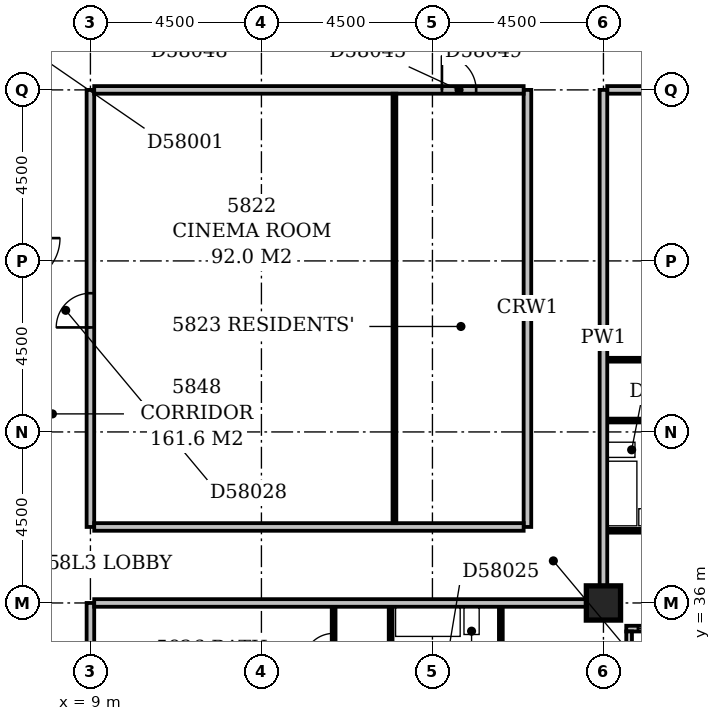
"""IFC4 building model, lengths in metres.
Left out: names, types, materials, properties, quantities, classifications, styles, units other than length and angle.
Written with IfcOpenShell. Run it as: python <this file> out.ifc"""

import sys

from ifc_helpers import new_model, si_unit, direction, frame, frame_2d, origin, origin_2d, place, context, subcontext, project, spatial, rectangle, extrude, element, fill, save


model = new_model("IFC4")
c1 = context("Model", 3, precision=1e-05, world=origin(), true_north=direction((0.0, 1.0)))
c2 = subcontext(c1, "Body", "Model", "MODEL_VIEW")
j1 = project(units=[si_unit("LENGTHUNIT", "METRE"), si_unit("PLANEANGLEUNIT", "RADIAN")], contexts=[c1])
p1 = place(None, origin())
s1 = spatial("IfcSite", under=j1, at=p1, CompositionType="ELEMENT")
p2 = place(p1, origin())
s2 = spatial("IfcBuilding", under=s1, at=p2, CompositionType="ELEMENT")
p3 = place(p2, frame((0.0, 0.0, 225.8)))
s3 = spatial("IfcBuildingStorey", under=s2, at=p3, CompositionType="ELEMENT", Elevation=225.8)
p4 = place(p3, frame((22.5, 36.0, -0.3), z_axis=(0.0, 0.0, 1.0), x_axis=(1.0, 0.0, 0.0)))
e1 = element("IfcColumn", 1, at=p4, inside=s3, PredefinedType="COLUMN", context=c2, shape_type="SweptSolid", body=[
    extrude(rectangle(XDim=0.9, YDim=0.9, at=origin_2d()), origin(), (0.0, 0.0, 1.0), 3.6),
])
p5 = place(p3, frame((23.175, 17.4, 0.0), z_axis=(0.0, 0.0, 1.0), x_axis=(0.0, 1.0, 0.0)))
e2 = element("IfcWall", 2, at=p5, inside=s3, PredefinedType="STANDARD", context=c2, shape_type="SweptSolid", body=[
    extrude(rectangle(XDim=17.85, YDim=0.15, at=frame_2d((8.925, 0.0))), origin(), (0.0, 0.0, 1.0), 2.7),
])
p6 = place(p5, frame((1.377, 0.0, 0.6)))
e3 = element("IfcOpeningElement", 3, at=p6, cuts=e2, PredefinedType="OPENING", context=c2, shape_type="SweptSolid", body=[
    extrude(rectangle(XDim=2.1, YDim=1.8, at=frame_2d((1.05, 0.9))), frame((0.0, 0.087, 0.0), z_axis=(0.0, -1.0, 0.0), x_axis=(1.0, 0.0, 0.0)), (0.0, 0.0, 1.0), 0.174),
])
p7 = place(p5, frame((6.15, 0.0, 0.6)))
e4 = element("IfcOpeningElement", 4, at=p7, cuts=e2, PredefinedType="OPENING", context=c2, shape_type="SweptSolid", body=[
    extrude(rectangle(XDim=2.4, YDim=1.8, at=frame_2d((1.2, 0.9))), frame((0.0, 0.087, 0.0), z_axis=(0.0, -1.0, 0.0), x_axis=(1.0, 0.0, 0.0)), (0.0, 0.0, 1.0), 0.174),
])
p8 = place(p5, frame((10.65, 0.0, 0.6)))
e5 = element("IfcOpeningElement", 5, at=p8, cuts=e2, PredefinedType="OPENING", context=c2, shape_type="SweptSolid", body=[
    extrude(rectangle(XDim=2.4, YDim=1.8, at=frame_2d((1.2, 0.9))), frame((0.0, 0.087, 0.0), z_axis=(0.0, -1.0, 0.0), x_axis=(1.0, 0.0, 0.0)), (0.0, 0.0, 1.0), 0.174),
])
p9 = place(p5, frame((15.15, 0.0, 0.6)))
e6 = element("IfcOpeningElement", 6, at=p9, cuts=e2, PredefinedType="OPENING", context=c2, shape_type="SweptSolid", body=[
    extrude(rectangle(XDim=2.4, YDim=1.8, at=frame_2d((1.2, 0.9))), frame((0.0, 0.087, 0.0), z_axis=(0.0, -1.0, 0.0), x_axis=(1.0, 0.0, 0.0)), (0.0, 0.0, 1.0), 0.174),
])
p10 = place(p3, frame((23.1, 35.325, 0.0), z_axis=(0.0, 0.0, 1.0), x_axis=(1.0, 0.0, 0.0)))
e7 = element("IfcWall", 7, at=p10, inside=s3, PredefinedType="STANDARD", context=c2, shape_type="SweptSolid", body=[
    extrude(rectangle(XDim=27.15, YDim=0.15, at=frame_2d((13.575, 0.0))), origin(), (0.0, 0.0, 1.0), 2.7),
])
p11 = place(p10, frame((0.306, 0.0, 0.6)))
e8 = element("IfcOpeningElement", 8, at=p11, cuts=e7, PredefinedType="OPENING", context=c2, shape_type="SweptSolid", body=[
    extrude(rectangle(XDim=2.1, YDim=1.8, at=frame_2d((1.05, 0.9))), frame((0.0, 0.087, 0.0), z_axis=(0.0, -1.0, 0.0), x_axis=(1.0, 0.0, 0.0)), (0.0, 0.0, 1.0), 0.174),
])
p12 = place(p10, frame((4.95, 0.0, 0.6)))
e9 = element("IfcOpeningElement", 9, at=p12, cuts=e7, PredefinedType="OPENING", context=c2, shape_type="SweptSolid", body=[
    extrude(rectangle(XDim=2.4, YDim=1.8, at=frame_2d((1.2, 0.9))), frame((0.0, 0.087, 0.0), z_axis=(0.0, -1.0, 0.0), x_axis=(1.0, 0.0, 0.0)), (0.0, 0.0, 1.0), 0.174),
])
p13 = place(p10, frame((9.45, 0.0, 0.6)))
e10 = element("IfcOpeningElement", 10, at=p13, cuts=e7, PredefinedType="OPENING", context=c2, shape_type="SweptSolid", body=[
    extrude(rectangle(XDim=2.4, YDim=1.8, at=frame_2d((1.2, 0.9))), frame((0.0, 0.087, 0.0), z_axis=(0.0, -1.0, 0.0), x_axis=(1.0, 0.0, 0.0)), (0.0, 0.0, 1.0), 0.174),
])
p14 = place(p10, frame((13.95, 0.0, 0.6)))
e11 = element("IfcOpeningElement", 11, at=p14, cuts=e7, PredefinedType="OPENING", context=c2, shape_type="SweptSolid", body=[
    extrude(rectangle(XDim=2.4, YDim=1.8, at=frame_2d((1.2, 0.9))), frame((0.0, 0.087, 0.0), z_axis=(0.0, -1.0, 0.0), x_axis=(1.0, 0.0, 0.0)), (0.0, 0.0, 1.0), 0.174),
])
p15 = place(p10, frame((18.45, 0.0, 0.6)))
e12 = element("IfcOpeningElement", 12, at=p15, cuts=e7, PredefinedType="OPENING", context=c2, shape_type="SweptSolid", body=[
    extrude(rectangle(XDim=2.4, YDim=1.8, at=frame_2d((1.2, 0.9))), frame((0.0, 0.087, 0.0), z_axis=(0.0, -1.0, 0.0), x_axis=(1.0, 0.0, 0.0)), (0.0, 0.0, 1.0), 0.174),
])
p16 = place(p10, frame((24.157, 0.0, 0.6)))
e13 = element("IfcOpeningElement", 13, at=p16, cuts=e7, PredefinedType="OPENING", context=c2, shape_type="SweptSolid", body=[
    extrude(rectangle(XDim=1.5, YDim=1.8, at=frame_2d((0.75, 0.9))), frame((0.0, 0.087, 0.0), z_axis=(0.0, -1.0, 0.0), x_axis=(1.0, 0.0, 0.0)), (0.0, 0.0, 1.0), 0.174),
])
p17 = place(p3, frame((9.0, 18.45, 0.0), z_axis=(0.0, 0.0, 1.0), x_axis=(0.0, 1.0, 0.0)))
e14 = element("IfcWall", 14, at=p17, inside=s3, PredefinedType="PARTITIONING", context=c2, shape_type="SweptSolid", body=[
    extrude(rectangle(XDim=17.55, YDim=0.2, at=frame_2d((8.775, 0.0))), origin(), (0.0, 0.0, 1.0), 3.3),
])
p18 = place(p17, frame((13.85, 0.0, 0.0)))
e15 = element("IfcOpeningElement", 15, at=p18, cuts=e14, PredefinedType="OPENING", context=c2, shape_type="SweptSolid", body=[
    extrude(rectangle(XDim=1.0, YDim=2.1, at=frame_2d((0.5, 1.05))), frame((0.0, 0.112, 0.0), z_axis=(0.0, -1.0, 0.0), x_axis=(1.0, 0.0, 0.0)), (0.0, 0.0, 1.0), 0.224),
])
p19 = place(p17, frame((3.25, 0.0, 0.0)))
e16 = element("IfcOpeningElement", 16, at=p19, cuts=e14, PredefinedType="OPENING", context=c2, shape_type="SweptSolid", body=[
    extrude(rectangle(XDim=1.0, YDim=2.1, at=frame_2d((0.5, 1.05))), frame((0.0, 0.112, 0.0), z_axis=(0.0, -1.0, 0.0), x_axis=(1.0, 0.0, 0.0)), (0.0, 0.0, 1.0), 0.224),
])
p20 = place(p3, frame((16.9, 27.1, 0.0), z_axis=(0.0, 0.0, 1.0), x_axis=(0.0, 1.0, 0.0)))
e17 = element("IfcWall", 17, at=p20, inside=s3, PredefinedType="PARTITIONING", context=c2, shape_type="SweptSolid", body=[
    extrude(rectangle(XDim=8.8, YDim=0.1, at=frame_2d((4.4, 0.0))), origin(), (0.0, 0.0, 1.0), 3.3),
])
p21 = place(p20, frame((1.7, 0.0, 0.0)))
e18 = element("IfcOpeningElement", 18, at=p21, cuts=e17, PredefinedType="OPENING", context=c2, shape_type="SweptSolid", body=[
    extrude(rectangle(XDim=0.9, YDim=2.1, at=frame_2d((0.45, 1.05))), frame((0.0, 0.062, 0.0), z_axis=(0.0, -1.0, 0.0), x_axis=(1.0, 0.0, 0.0)), (0.0, 0.0, 1.0), 0.124),
])
p22 = place(p20, frame((5.05, 0.0, 0.0)))
e19 = element("IfcOpeningElement", 19, at=p22, cuts=e17, PredefinedType="OPENING", context=c2, shape_type="SweptSolid", body=[
    extrude(rectangle(XDim=0.9, YDim=2.1, at=frame_2d((0.45, 1.05))), frame((0.0, 0.062, 0.0), z_axis=(0.0, -1.0, 0.0), x_axis=(1.0, 0.0, 0.0)), (0.0, 0.0, 1.0), 0.124),
])
p23 = place(p3, frame((15.4, 33.6, 0.0), z_axis=(0.0, 0.0, 1.0), x_axis=(0.0, 1.0, 0.0)))
e20 = element("IfcWall", 20, at=p23, inside=s3, PredefinedType="PARTITIONING", context=c2, shape_type="SweptSolid", body=[
    extrude(rectangle(XDim=2.3, YDim=0.1, at=frame_2d((1.15, 0.0))), origin(), (0.0, 0.0, 1.0), 3.3),
])
p24 = place(p23, frame((0.8, 0.0, 0.0)))
e21 = element("IfcOpeningElement", 21, at=p24, cuts=e20, PredefinedType="OPENING", context=c2, shape_type="SweptSolid", body=[
    extrude(rectangle(XDim=0.8, YDim=2.1, at=frame_2d((0.4, 1.05))), frame((0.0, 0.062, 0.0), z_axis=(0.0, -1.0, 0.0), x_axis=(1.0, 0.0, 0.0)), (0.0, 0.0, 1.0), 0.124),
])
p25 = place(p3, frame((19.8, 33.7, 0.0), z_axis=(0.0, 0.0, 1.0), x_axis=(0.0, 1.0, 0.0)))
e22 = element("IfcWall", 22, at=p25, inside=s3, PredefinedType="PLUMBINGWALL", context=c2, shape_type="SweptSolid", body=[
    extrude(rectangle(XDim=2.2, YDim=0.1, at=frame_2d((1.1, 0.0))), origin(), (0.0, 0.0, 1.0), 3.3),
])
p26 = place(p3, frame((9.1, 36.0, 0.0), z_axis=(0.0, 0.0, 1.0), x_axis=(1.0, 0.0, 0.0)))
e23 = element("IfcWall", 23, at=p26, inside=s3, PredefinedType="PARTITIONING", context=c2, shape_type="SweptSolid", body=[
    extrude(rectangle(XDim=12.95, YDim=0.2, at=frame_2d((6.475, 0.0))), origin(), (0.0, 0.0, 1.0), 3.3),
])
p27 = place(p3, frame((22.5, 36.45, 0.0), z_axis=(0.0, 0.0, 1.0), x_axis=(0.0, 1.0, 0.0)))
e24 = element("IfcWall", 24, at=p27, inside=s3, PredefinedType="PARTITIONING", context=c2, shape_type="SweptSolid", body=[
    extrude(rectangle(XDim=13.05, YDim=0.2, at=frame_2d((6.525, 0.0))), origin(), (0.0, 0.0, 1.0), 3.3),
])
p28 = place(p3, frame((22.6, 37.9, 0.0), z_axis=(0.0, 0.0, 1.0), x_axis=(1.0, 0.0, 0.0)))
e25 = element("IfcWall", 25, at=p28, inside=s3, PredefinedType="PLUMBINGWALL", context=c2, shape_type="SweptSolid", body=[
    extrude(rectangle(XDim=2.15, YDim=0.1, at=frame_2d((1.075, 0.0))), origin(), (0.0, 0.0, 1.0), 3.3),
])
p29 = place(p3, frame((9.0, 38.0, 0.0), z_axis=(0.0, 0.0, 1.0), x_axis=(0.0, 1.0, 0.0)))
e26 = element("IfcWall", 26, at=p29, inside=s3, PredefinedType="PARTITIONING", context=c2, shape_type="SweptSolid", body=[
    extrude(rectangle(XDim=11.5, YDim=0.2, at=frame_2d((5.75, 0.0))), origin(), (0.0, 0.0, 1.0), 3.3),
])
p30 = place(p29, frame((5.25, 0.0, 0.0)))
e27 = element("IfcOpeningElement", 27, at=p30, cuts=e26, PredefinedType="OPENING", context=c2, shape_type="SweptSolid", body=[
    extrude(rectangle(XDim=0.9, YDim=2.1, at=frame_2d((0.45, 1.05))), frame((0.0, 0.112, 0.0), z_axis=(0.0, -1.0, 0.0), x_axis=(1.0, 0.0, 0.0)), (0.0, 0.0, 1.0), 0.224),
])
p31 = place(p3, frame((9.1, 38.0, 0.0), z_axis=(0.0, 0.0, 1.0), x_axis=(1.0, 0.0, 0.0)))
e28 = element("IfcWall", 28, at=p31, inside=s3, PredefinedType="PARTITIONING", context=c2, shape_type="SweptSolid", body=[
    extrude(rectangle(XDim=11.3, YDim=0.2, at=frame_2d((5.65, 0.0))), origin(), (0.0, 0.0, 1.0), 3.3),
])
p32 = place(p3, frame((20.5, 38.0, 0.0), z_axis=(0.0, 0.0, 1.0), x_axis=(0.0, 1.0, 0.0)))
e29 = element("IfcWall", 29, at=p32, inside=s3, PredefinedType="PARTITIONING", context=c2, shape_type="SweptSolid", body=[
    extrude(rectangle(XDim=11.5, YDim=0.2, at=frame_2d((5.75, 0.0))), origin(), (0.0, 0.0, 1.0), 3.3),
])
p33 = place(p3, frame((17.0, 38.1, 0.0), z_axis=(0.0, 0.0, 1.0), x_axis=(0.0, 1.0, 0.0)))
e30 = element("IfcWall", 30, at=p33, inside=s3, PredefinedType="PARTITIONING", context=c2, shape_type="SweptSolid", body=[
    extrude(rectangle(XDim=11.3, YDim=0.1, at=frame_2d((5.65, 0.0))), origin(), (0.0, 0.0, 1.0), 3.3),
])
p34 = place(p3, frame((22.6, 40.8, 0.0), z_axis=(0.0, 0.0, 1.0), x_axis=(1.0, 0.0, 0.0)))
e31 = element("IfcWall", 31, at=p34, inside=s3, PredefinedType="PARTITIONING", context=c2, shape_type="SweptSolid", body=[
    extrude(rectangle(XDim=22.3, YDim=0.1, at=frame_2d((11.15, 0.0))), origin(), (0.0, 0.0, 1.0), 3.3),
])
p35 = place(p34, frame((2.85, 0.0, 0.0)))
e32 = element("IfcOpeningElement", 32, at=p35, cuts=e31, PredefinedType="OPENING", context=c2, shape_type="SweptSolid", body=[
    extrude(rectangle(XDim=0.9, YDim=2.1, at=frame_2d((0.45, 1.05))), frame((0.0, 0.062, 0.0), z_axis=(0.0, -1.0, 0.0), x_axis=(1.0, 0.0, 0.0)), (0.0, 0.0, 1.0), 0.124),
])
p36 = place(p34, frame((8.4, 0.0, 0.0)))
e33 = element("IfcOpeningElement", 33, at=p36, cuts=e31, PredefinedType="OPENING", context=c2, shape_type="SweptSolid", body=[
    extrude(rectangle(XDim=0.9, YDim=2.1, at=frame_2d((0.45, 1.05))), frame((0.0, 0.062, 0.0), z_axis=(0.0, -1.0, 0.0), x_axis=(1.0, 0.0, 0.0)), (0.0, 0.0, 1.0), 0.124),
])
p37 = place(p34, frame((14.05, 0.0, 0.0)))
e34 = element("IfcOpeningElement", 34, at=p37, cuts=e31, PredefinedType="OPENING", context=c2, shape_type="SweptSolid", body=[
    extrude(rectangle(XDim=0.9, YDim=2.1, at=frame_2d((0.45, 1.05))), frame((0.0, 0.062, 0.0), z_axis=(0.0, -1.0, 0.0), x_axis=(1.0, 0.0, 0.0)), (0.0, 0.0, 1.0), 0.124),
])
p38 = place(p34, frame((19.7, 0.0, 0.0)))
e35 = element("IfcOpeningElement", 35, at=p38, cuts=e31, PredefinedType="OPENING", context=c2, shape_type="SweptSolid", body=[
    extrude(rectangle(XDim=0.9, YDim=2.1, at=frame_2d((0.45, 1.05))), frame((0.0, 0.062, 0.0), z_axis=(0.0, -1.0, 0.0), x_axis=(1.0, 0.0, 0.0)), (0.0, 0.0, 1.0), 0.124),
])
p39 = place(p3, frame((22.6, 42.4, 0.0), z_axis=(0.0, 0.0, 1.0), x_axis=(1.0, 0.0, 0.0)))
e36 = element("IfcWall", 36, at=p39, inside=s3, PredefinedType="PARTITIONING", context=c2, shape_type="SweptSolid", body=[
    extrude(rectangle(XDim=5.815, YDim=0.1, at=frame_2d((2.908, 0.0))), origin(), (0.0, 0.0, 1.0), 3.3),
])
p40 = place(p39, frame((2.408, 0.0, 0.0)))
e37 = element("IfcOpeningElement", 37, at=p40, cuts=e36, PredefinedType="OPENING", context=c2, shape_type="SweptSolid", body=[
    extrude(rectangle(XDim=0.9, YDim=2.1, at=frame_2d((0.45, 1.05))), frame((0.0, 0.062, 0.0), z_axis=(0.0, -1.0, 0.0), x_axis=(1.0, 0.0, 0.0)), (0.0, 0.0, 1.0), 0.124),
])
p41 = place(p3, frame((9.1, 49.5, 0.0), z_axis=(0.0, 0.0, 1.0), x_axis=(1.0, 0.0, 0.0)))
e38 = element("IfcWall", 38, at=p41, inside=s3, PredefinedType="PARTITIONING", context=c2, shape_type="SweptSolid", body=[
    extrude(rectangle(XDim=11.3, YDim=0.2, at=frame_2d((5.65, 0.0))), origin(), (0.0, 0.0, 1.0), 3.3),
])
p42 = place(p41, frame((9.15, 0.0, 0.0)))
e39 = element("IfcOpeningElement", 39, at=p42, cuts=e38, PredefinedType="OPENING", context=c2, shape_type="SweptSolid", body=[
    extrude(rectangle(XDim=0.9, YDim=2.1, at=frame_2d((0.45, 1.05))), frame((0.0, 0.112, 0.0), z_axis=(0.0, -1.0, 0.0), x_axis=(1.0, 0.0, 0.0)), (0.0, 0.0, 1.0), 0.224),
])
p43 = place(p3, frame((22.6, 49.5, 0.0), z_axis=(0.0, 0.0, 1.0), x_axis=(1.0, 0.0, 0.0)))
e40 = element("IfcWall", 40, at=p43, inside=s3, PredefinedType="PARTITIONING", context=c2, shape_type="SweptSolid", body=[
    extrude(rectangle(XDim=30.95, YDim=0.2, at=frame_2d((15.475, 0.0))), origin(), (0.0, 0.0, 1.0), 3.3),
])
p44 = place(p43, frame((6.115, 0.0, 0.0)))
e41 = element("IfcOpeningElement", 41, at=p44, cuts=e40, PredefinedType="OPENING", context=c2, shape_type="SweptSolid", body=[
    extrude(rectangle(XDim=1.0, YDim=2.1, at=frame_2d((0.5, 1.05))), frame((0.0, 0.112, 0.0), z_axis=(0.0, -1.0, 0.0), x_axis=(1.0, 0.0, 0.0)), (0.0, 0.0, 1.0), 0.224),
])
p45 = place(p43, frame((22.7, 0.0, 0.0)))
e42 = element("IfcOpeningElement", 42, at=p45, cuts=e40, PredefinedType="OPENING", context=c2, shape_type="SweptSolid", body=[
    extrude(rectangle(XDim=1.0, YDim=2.1, at=frame_2d((0.5, 1.05))), frame((0.0, 0.112, 0.0), z_axis=(0.0, -1.0, 0.0), x_axis=(1.0, 0.0, 0.0)), (0.0, 0.0, 1.0), 0.224),
])
p46 = place(p11, origin())
e43 = element("IfcWindow", 43, at=p46, inside=s3, PartitioningType="SINGLE_PANEL", PredefinedType="WINDOW", context=c2, shape_type="SweptSolid", body=[
    extrude(rectangle(XDim=2.1, YDim=1.8, at=frame_2d((1.05, 0.9))), frame((0.0, 0.03, 0.0), z_axis=(0.0, -1.0, 0.0), x_axis=(1.0, 0.0, 0.0)), (0.0, 0.0, 1.0), 0.06),
])
fill(e8, e43)
p47 = place(p24, origin())
e44 = element("IfcDoor", 44, at=p47, inside=s3, OperationType="SINGLE_SWING_LEFT", PredefinedType="DOOR", context=c2, shape_type="SweptSolid", body=[
    extrude(rectangle(XDim=0.8, YDim=2.1, at=frame_2d((0.4, 1.05))), frame((0.0, 0.025, 0.0), z_axis=(0.0, -1.0, 0.0), x_axis=(1.0, 0.0, 0.0)), (0.0, 0.0, 1.0), 0.05),
])
fill(e21, e44)
p48 = place(p30, origin())
e45 = element("IfcDoor", 45, at=p48, inside=s3, OperationType="SINGLE_SWING_LEFT", PredefinedType="DOOR", context=c2, shape_type="SweptSolid", body=[
    extrude(rectangle(XDim=0.9, YDim=2.1, at=frame_2d((0.45, 1.05))), frame((0.0, 0.025, 0.0), z_axis=(0.0, -1.0, 0.0), x_axis=(1.0, 0.0, 0.0)), (0.0, 0.0, 1.0), 0.05),
])
fill(e27, e45)
p49 = place(p42, origin())
e46 = element("IfcDoor", 46, at=p49, inside=s3, OperationType="SINGLE_SWING_LEFT", PredefinedType="DOOR", context=c2, shape_type="SweptSolid", body=[
    extrude(rectangle(XDim=0.9, YDim=2.1, at=frame_2d((0.45, 1.05))), frame((0.0, 0.025, 0.0), z_axis=(0.0, -1.0, 0.0), x_axis=(1.0, 0.0, 0.0)), (0.0, 0.0, 1.0), 0.05),
])
fill(e39, e46)
save(model, sys.argv[1])
